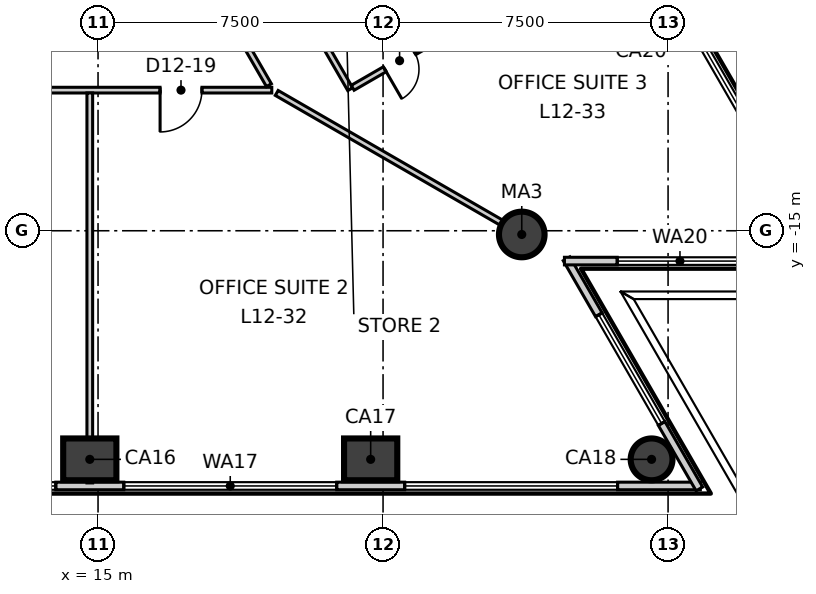
"""IFC4 building model, lengths in metres.
Left out: names, types, materials, properties, quantities, classifications, styles, units other than length and angle.
Written with IfcOpenShell. Run it as: python <this file> out.ifc"""

import sys

from ifc_helpers import new_model, si_unit, direction, frame, frame_2d, origin, origin_2d, place, context, subcontext, project, spatial, rectangle, circle, extrude, element, fill, save


model = new_model("IFC4")
c1 = context("Model", 3, precision=1e-05, world=origin(), true_north=direction((0.0, 1.0)))
c2 = subcontext(c1, "Body", "Model", "MODEL_VIEW")
j1 = project(units=[si_unit("LENGTHUNIT", "METRE"), si_unit("PLANEANGLEUNIT", "RADIAN")], contexts=[c1])
p1 = place(None, origin())
s1 = spatial("IfcSite", under=j1, at=p1, CompositionType="ELEMENT")
p2 = place(p1, origin())
s2 = spatial("IfcBuilding", under=s1, at=p2, CompositionType="ELEMENT")
p3 = place(p2, frame((0.0, 0.0, 59.3)))
s3 = spatial("IfcBuildingStorey", under=s2, at=p3, CompositionType="ELEMENT", Elevation=59.3)
for number, where, z_axis, x_axis in (
    (1, (14.783, -21.015, -0.3), (0.0, 0.0, 1.0), (1.0, 0.0, 0.0)),
    (2, (22.174, -21.015, -0.3), (0.0, 0.0, 1.0), (1.0, 0.0, 0.0)),
):
    element("IfcColumn", number, at=place(p3, frame(where, z_axis=z_axis, x_axis=x_axis)), inside=s3, PredefinedType="COLUMN", context=c2, shape_type="SweptSolid", body=[
        extrude(rectangle(XDim=1.4, YDim=1.1, at=origin_2d()), origin(), (0.0, 0.0, 1.0), 4.0),
    ])
p4 = place(p3, frame((29.566, -21.015, -0.3), z_axis=(0.0, 0.0, 1.0), x_axis=(1.0, 0.0, 0.0)))
e3 = element("IfcColumn", 3, at=p4, inside=s3, PredefinedType="COLUMN", context=c2, shape_type="SweptSolid", body=[
    extrude(circle(Radius=0.55, at=origin_2d()), origin(), (0.0, 0.0, 1.0), 4.0),
])
p5 = place(p3, frame((26.15, -15.098, -0.3), z_axis=(0.0, 0.0, 1.0), x_axis=(1.0, 0.0, 0.0)))
e4 = element("IfcColumn", 4, at=p5, inside=s3, PredefinedType="COLUMN", context=c2, shape_type="SweptSolid", body=[
    extrude(circle(Radius=0.6, at=origin_2d()), origin(), (0.0, 0.0, 1.0), 4.0),
])
p6 = place(p3, frame((-30.869, -21.715, 0.0), z_axis=(0.0, 0.0, 1.0), x_axis=(1.0, 0.0, 0.0)))
e5 = element("IfcWall", 5, at=p6, inside=s3, PredefinedType="ELEMENTEDWALL", context=c2, shape_type="SweptSolid", body=[
    extrude(rectangle(XDim=61.718, YDim=0.2, at=frame_2d((30.859, 0.0))), origin(), (0.0, 0.0, 1.0), 3.7),
])
p7 = place(p6, frame((2.199, 0.0, 0.9)))
e6 = element("IfcOpeningElement", 6, at=p7, cuts=e5, PredefinedType="OPENING", context=c2, shape_type="SweptSolid", body=[
    extrude(rectangle(XDim=5.6, YDim=2.5, at=frame_2d((2.8, 1.25))), frame((0.0, 0.11, 0.0), z_axis=(0.0, -1.0, 0.0), x_axis=(1.0, 0.0, 0.0)), (0.0, 0.0, 1.0), 0.22),
])
p8 = place(p6, frame((9.59, 0.0, 0.9)))
e7 = element("IfcOpeningElement", 7, at=p8, cuts=e5, PredefinedType="OPENING", context=c2, shape_type="SweptSolid", body=[
    extrude(rectangle(XDim=5.6, YDim=2.5, at=frame_2d((2.8, 1.25))), frame((0.0, 0.11, 0.0), z_axis=(0.0, -1.0, 0.0), x_axis=(1.0, 0.0, 0.0)), (0.0, 0.0, 1.0), 0.22),
])
p9 = place(p6, frame((16.982, 0.0, 0.9)))
e8 = element("IfcOpeningElement", 8, at=p9, cuts=e5, PredefinedType="OPENING", context=c2, shape_type="SweptSolid", body=[
    extrude(rectangle(XDim=5.6, YDim=2.5, at=frame_2d((2.8, 1.25))), frame((0.0, 0.11, 0.0), z_axis=(0.0, -1.0, 0.0), x_axis=(1.0, 0.0, 0.0)), (0.0, 0.0, 1.0), 0.22),
])
p10 = place(p6, frame((24.373, 0.0, 0.9)))
e9 = element("IfcOpeningElement", 9, at=p10, cuts=e5, PredefinedType="OPENING", context=c2, shape_type="SweptSolid", body=[
    extrude(rectangle(XDim=5.6, YDim=2.5, at=frame_2d((2.8, 1.25))), frame((0.0, 0.11, 0.0), z_axis=(0.0, -1.0, 0.0), x_axis=(1.0, 0.0, 0.0)), (0.0, 0.0, 1.0), 0.22),
])
p11 = place(p6, frame((31.765, 0.0, 0.9)))
e10 = element("IfcOpeningElement", 10, at=p11, cuts=e5, PredefinedType="OPENING", context=c2, shape_type="SweptSolid", body=[
    extrude(rectangle(XDim=5.6, YDim=2.5, at=frame_2d((2.8, 1.25))), frame((0.0, 0.11, 0.0), z_axis=(0.0, -1.0, 0.0), x_axis=(1.0, 0.0, 0.0)), (0.0, 0.0, 1.0), 0.22),
])
p12 = place(p6, frame((39.156, 0.0, 0.9)))
e11 = element("IfcOpeningElement", 11, at=p12, cuts=e5, PredefinedType="OPENING", context=c2, shape_type="SweptSolid", body=[
    extrude(rectangle(XDim=5.6, YDim=2.5, at=frame_2d((2.8, 1.25))), frame((0.0, 0.11, 0.0), z_axis=(0.0, -1.0, 0.0), x_axis=(1.0, 0.0, 0.0)), (0.0, 0.0, 1.0), 0.22),
])
p13 = place(p6, frame((46.548, 0.0, 0.9)))
e12 = element("IfcOpeningElement", 12, at=p13, cuts=e5, PredefinedType="OPENING", context=c2, shape_type="SweptSolid", body=[
    extrude(rectangle(XDim=5.6, YDim=2.5, at=frame_2d((2.8, 1.25))), frame((0.0, 0.11, 0.0), z_axis=(0.0, -1.0, 0.0), x_axis=(1.0, 0.0, 0.0)), (0.0, 0.0, 1.0), 0.22),
])
p14 = place(p6, frame((53.939, 0.0, 0.9)))
e13 = element("IfcOpeningElement", 13, at=p14, cuts=e5, PredefinedType="OPENING", context=c2, shape_type="SweptSolid", body=[
    extrude(rectangle(XDim=5.6, YDim=2.5, at=frame_2d((2.8, 1.25))), frame((0.0, 0.11, 0.0), z_axis=(0.0, -1.0, 0.0), x_axis=(1.0, 0.0, 0.0)), (0.0, 0.0, 1.0), 0.22),
])
p15 = place(p3, frame((30.824, -21.793, 0.0), z_axis=(0.0, 0.0, 1.0), x_axis=(-0.499969272857, 0.866043143382, 0.0)))
e14 = element("IfcWall", 14, at=p15, inside=s3, PredefinedType="ELEMENTEDWALL", context=c2, shape_type="SweptSolid", body=[
    extrude(rectangle(XDim=6.993, YDim=0.2, at=frame_2d((3.496, 0.0))), origin(), (0.0, 0.0, 1.0), 3.7),
])
p16 = place(p15, frame((1.99, 0.0, 0.9)))
e15 = element("IfcOpeningElement", 15, at=p16, cuts=e14, PredefinedType="OPENING", context=c2, shape_type="SweptSolid", body=[
    extrude(rectangle(XDim=3.3, YDim=2.5, at=frame_2d((1.65, 1.25))), frame((0.0, 0.11, 0.0), z_axis=(0.0, -1.0, 0.0), x_axis=(1.0, 0.0, 0.0)), (0.0, 0.0, 1.0), 0.22),
])
p17 = place(p3, frame((27.273, -15.798, 0.0), z_axis=(0.0, 0.0, 1.0), x_axis=(1.0, 0.0, 0.0)))
e16 = element("IfcWall", 16, at=p17, inside=s3, PredefinedType="ELEMENTEDWALL", context=c2, shape_type="SweptSolid", body=[
    extrude(rectangle(XDim=6.993, YDim=0.2, at=frame_2d((3.497, 0.0))), origin(), (0.0, 0.0, 1.0), 3.7),
])
p18 = place(p17, frame((1.39, 0.0, 0.9)))
e17 = element("IfcOpeningElement", 17, at=p18, cuts=e16, PredefinedType="OPENING", context=c2, shape_type="SweptSolid", body=[
    extrude(rectangle(XDim=3.3, YDim=2.5, at=frame_2d((1.65, 1.25))), frame((0.0, 0.11, 0.0), z_axis=(0.0, -1.0, 0.0), x_axis=(1.0, 0.0, 0.0)), (0.0, 0.0, 1.0), 0.22),
])
p19 = place(p3, frame((34.241, -15.876, 0.0), z_axis=(0.0, 0.0, 1.0), x_axis=(-0.500006313899, 0.866021758423, 0.0)))
e18 = element("IfcWall", 18, at=p19, inside=s3, PredefinedType="ELEMENTEDWALL", context=c2, shape_type="SweptSolid", body=[
    extrude(rectangle(XDim=61.719, YDim=0.2, at=frame_2d((30.859, 0.0))), origin(), (0.0, 0.0, 1.0), 3.7),
])
p20 = place(p19, frame((2.199, 0.0, 0.9)))
e19 = element("IfcOpeningElement", 19, at=p20, cuts=e18, PredefinedType="OPENING", context=c2, shape_type="SweptSolid", body=[
    extrude(rectangle(XDim=5.6, YDim=2.5, at=frame_2d((2.8, 1.25))), frame((0.0, 0.11, 0.0), z_axis=(0.0, -1.0, 0.0), x_axis=(1.0, 0.0, 0.0)), (0.0, 0.0, 1.0), 0.22),
])
p21 = place(p19, frame((9.59, 0.0, 0.9)))
e20 = element("IfcOpeningElement", 20, at=p21, cuts=e18, PredefinedType="OPENING", context=c2, shape_type="SweptSolid", body=[
    extrude(rectangle(XDim=5.6, YDim=2.5, at=frame_2d((2.8, 1.25))), frame((0.0, 0.11, 0.0), z_axis=(0.0, -1.0, 0.0), x_axis=(1.0, 0.0, 0.0)), (0.0, 0.0, 1.0), 0.22),
])
p22 = place(p19, frame((16.982, 0.0, 0.9)))
e21 = element("IfcOpeningElement", 21, at=p22, cuts=e18, PredefinedType="OPENING", context=c2, shape_type="SweptSolid", body=[
    extrude(rectangle(XDim=5.6, YDim=2.5, at=frame_2d((2.8, 1.25))), frame((0.0, 0.11, 0.0), z_axis=(0.0, -1.0, 0.0), x_axis=(1.0, 0.0, 0.0)), (0.0, 0.0, 1.0), 0.22),
])
p23 = place(p19, frame((24.374, 0.0, 0.9)))
e22 = element("IfcOpeningElement", 22, at=p23, cuts=e18, PredefinedType="OPENING", context=c2, shape_type="SweptSolid", body=[
    extrude(rectangle(XDim=5.6, YDim=2.5, at=frame_2d((2.8, 1.25))), frame((0.0, 0.11, 0.0), z_axis=(0.0, -1.0, 0.0), x_axis=(1.0, 0.0, 0.0)), (0.0, 0.0, 1.0), 0.22),
])
p24 = place(p19, frame((31.765, 0.0, 0.9)))
e23 = element("IfcOpeningElement", 23, at=p24, cuts=e18, PredefinedType="OPENING", context=c2, shape_type="SweptSolid", body=[
    extrude(rectangle(XDim=5.6, YDim=2.5, at=frame_2d((2.8, 1.25))), frame((0.0, 0.11, 0.0), z_axis=(0.0, -1.0, 0.0), x_axis=(1.0, 0.0, 0.0)), (0.0, 0.0, 1.0), 0.22),
])
p25 = place(p19, frame((39.157, 0.0, 0.9)))
e24 = element("IfcOpeningElement", 24, at=p25, cuts=e18, PredefinedType="OPENING", context=c2, shape_type="SweptSolid", body=[
    extrude(rectangle(XDim=5.6, YDim=2.5, at=frame_2d((2.8, 1.25))), frame((0.0, 0.11, 0.0), z_axis=(0.0, -1.0, 0.0), x_axis=(1.0, 0.0, 0.0)), (0.0, 0.0, 1.0), 0.22),
])
p26 = place(p19, frame((46.549, 0.0, 0.9)))
e25 = element("IfcOpeningElement", 25, at=p26, cuts=e18, PredefinedType="OPENING", context=c2, shape_type="SweptSolid", body=[
    extrude(rectangle(XDim=5.6, YDim=2.5, at=frame_2d((2.8, 1.25))), frame((0.0, 0.11, 0.0), z_axis=(0.0, -1.0, 0.0), x_axis=(1.0, 0.0, 0.0)), (0.0, 0.0, 1.0), 0.22),
])
p27 = place(p19, frame((53.94, 0.0, 0.9)))
e26 = element("IfcOpeningElement", 26, at=p27, cuts=e18, PredefinedType="OPENING", context=c2, shape_type="SweptSolid", body=[
    extrude(rectangle(XDim=5.6, YDim=2.5, at=frame_2d((2.8, 1.25))), frame((0.0, 0.11, 0.0), z_axis=(0.0, -1.0, 0.0), x_axis=(1.0, 0.0, 0.0)), (0.0, 0.0, 1.0), 0.22),
])
p28 = place(p3, frame((-19.422, -11.3, 0.0), z_axis=(0.0, 0.0, 1.0), x_axis=(1.0, 0.0, 0.0)))
e27 = element("IfcWall", 27, at=p28, inside=s3, PredefinedType="PARTITIONING", context=c2, shape_type="SweptSolid", body=[
    extrude(rectangle(XDim=38.994, YDim=0.15, at=frame_2d((19.497, 0.0))), origin(), (0.0, 0.0, 1.0), 3.7),
])
p29 = place(p28, frame((1.7, 0.0, 0.0)))
e28 = element("IfcOpeningElement", 28, at=p29, cuts=e27, PredefinedType="OPENING", context=c2, shape_type="SweptSolid", body=[
    extrude(rectangle(XDim=1.1, YDim=2.1, at=frame_2d((0.55, 1.05))), frame((0.0, 0.085, 0.0), z_axis=(0.0, -1.0, 0.0), x_axis=(1.0, 0.0, 0.0)), (0.0, 0.0, 1.0), 0.17),
])
p30 = place(p28, frame((12.889, 0.0, 0.0)))
e29 = element("IfcOpeningElement", 29, at=p30, cuts=e27, PredefinedType="OPENING", context=c2, shape_type="SweptSolid", body=[
    extrude(rectangle(XDim=1.0, YDim=2.1, at=frame_2d((0.5, 1.05))), frame((0.0, 0.085, 0.0), z_axis=(0.0, -1.0, 0.0), x_axis=(1.0, 0.0, 0.0)), (0.0, 0.0, 1.0), 0.17),
])
p31 = place(p28, frame((5.589, 0.0, 0.0)))
e30 = element("IfcOpeningElement", 30, at=p31, cuts=e27, PredefinedType="OPENING", context=c2, shape_type="SweptSolid", body=[
    extrude(rectangle(XDim=0.9, YDim=2.1, at=frame_2d((0.45, 1.05))), frame((0.0, 0.085, 0.0), z_axis=(0.0, -1.0, 0.0), x_axis=(1.0, 0.0, 0.0)), (0.0, 0.0, 1.0), 0.17),
])
p32 = place(p28, frame((29.272, 0.0, 0.0)))
e31 = element("IfcOpeningElement", 31, at=p32, cuts=e27, PredefinedType="OPENING", context=c2, shape_type="SweptSolid", body=[
    extrude(rectangle(XDim=1.1, YDim=2.1, at=frame_2d((0.55, 1.05))), frame((0.0, 0.085, 0.0), z_axis=(0.0, -1.0, 0.0), x_axis=(1.0, 0.0, 0.0)), (0.0, 0.0, 1.0), 0.17),
])
p33 = place(p28, frame((20.772, 0.0, 0.0)))
e32 = element("IfcOpeningElement", 32, at=p33, cuts=e27, PredefinedType="OPENING", context=c2, shape_type="SweptSolid", body=[
    extrude(rectangle(XDim=0.9, YDim=2.1, at=frame_2d((0.45, 1.05))), frame((0.0, 0.085, 0.0), z_axis=(0.0, -1.0, 0.0), x_axis=(1.0, 0.0, 0.0)), (0.0, 0.0, 1.0), 0.17),
])
p34 = place(p28, frame((23.772, 0.0, 0.0)))
e33 = element("IfcOpeningElement", 33, at=p34, cuts=e27, PredefinedType="OPENING", context=c2, shape_type="SweptSolid", body=[
    extrude(rectangle(XDim=0.9, YDim=2.1, at=frame_2d((0.45, 1.05))), frame((0.0, 0.085, 0.0), z_axis=(0.0, -1.0, 0.0), x_axis=(1.0, 0.0, 0.0)), (0.0, 0.0, 1.0), 0.17),
])
p35 = place(p28, frame((36.055, 0.0, 0.0)))
e34 = element("IfcOpeningElement", 34, at=p35, cuts=e27, PredefinedType="OPENING", context=c2, shape_type="SweptSolid", body=[
    extrude(rectangle(XDim=1.1, YDim=2.1, at=frame_2d((0.55, 1.05))), frame((0.0, 0.085, 0.0), z_axis=(0.0, -1.0, 0.0), x_axis=(1.0, 0.0, 0.0)), (0.0, 0.0, 1.0), 0.17),
])
p36 = place(p3, frame((19.702, -11.374, 0.0), z_axis=(0.0, 0.0, 1.0), x_axis=(0.866050014035, -0.499957371373, 0.0)))
e35 = element("IfcWall", 35, at=p36, inside=s3, PredefinedType="PARTITIONING", context=c2, shape_type="SweptSolid", body=[
    extrude(rectangle(XDim=8.067, YDim=0.15, at=frame_2d((4.033, 0.0))), origin(), (0.0, 0.0, 1.0), 3.1),
])
p37 = place(p3, frame((0.075, 22.47, 0.0), z_axis=(0.0, 0.0, 1.0), x_axis=(0.500002280369, -0.866024087209, 0.0)))
e36 = element("IfcWall", 36, at=p37, inside=s3, PredefinedType="PARTITIONING", context=c2, shape_type="SweptSolid", body=[
    extrude(rectangle(XDim=38.844, YDim=0.15, at=frame_2d((19.422, 0.0))), origin(), (0.0, 0.0, 1.0), 3.7),
])
p38 = place(p37, frame((36.044, 0.0, 0.0)))
e37 = element("IfcOpeningElement", 37, at=p38, cuts=e36, PredefinedType="OPENING", context=c2, shape_type="SweptSolid", body=[
    extrude(rectangle(XDim=1.1, YDim=2.1, at=frame_2d((0.55, 1.05))), frame((0.0, 0.085, 0.0), z_axis=(0.0, -1.0, 0.0), x_axis=(1.0, 0.0, 0.0)), (0.0, 0.0, 1.0), 0.17),
])
p39 = place(p37, frame((26.255, 0.0, 0.0)))
e38 = element("IfcOpeningElement", 38, at=p39, cuts=e36, PredefinedType="OPENING", context=c2, shape_type="SweptSolid", body=[
    extrude(rectangle(XDim=1.1, YDim=2.1, at=frame_2d((0.55, 1.05))), frame((0.0, 0.085, 0.0), z_axis=(0.0, -1.0, 0.0), x_axis=(1.0, 0.0, 0.0)), (0.0, 0.0, 1.0), 0.17),
])
p40 = place(p37, frame((9.173, 0.0, 0.0)))
e39 = element("IfcOpeningElement", 39, at=p40, cuts=e36, PredefinedType="OPENING", context=c2, shape_type="SweptSolid", body=[
    extrude(rectangle(XDim=1.1, YDim=2.1, at=frame_2d((0.55, 1.05))), frame((0.0, 0.085, 0.0), z_axis=(0.0, -1.0, 0.0), x_axis=(1.0, 0.0, 0.0)), (0.0, 0.0, 1.0), 0.17),
])
p41 = place(p37, frame((17.373, 0.0, 0.0)))
e40 = element("IfcOpeningElement", 40, at=p41, cuts=e36, PredefinedType="OPENING", context=c2, shape_type="SweptSolid", body=[
    extrude(rectangle(XDim=0.9, YDim=2.1, at=frame_2d((0.45, 1.05))), frame((0.0, 0.085, 0.0), z_axis=(0.0, -1.0, 0.0), x_axis=(1.0, 0.0, 0.0)), (0.0, 0.0, 1.0), 0.17),
])
p42 = place(p37, frame((14.173, 0.0, 0.0)))
e41 = element("IfcOpeningElement", 41, at=p42, cuts=e36, PredefinedType="OPENING", context=c2, shape_type="SweptSolid", body=[
    extrude(rectangle(XDim=0.9, YDim=2.1, at=frame_2d((0.45, 1.05))), frame((0.0, 0.085, 0.0), z_axis=(0.0, -1.0, 0.0), x_axis=(1.0, 0.0, 0.0)), (0.0, 0.0, 1.0), 0.17),
])
p43 = place(p37, frame((11.273, 0.0, 0.0)))
e42 = element("IfcOpeningElement", 42, at=p43, cuts=e36, PredefinedType="OPENING", context=c2, shape_type="SweptSolid", body=[
    extrude(rectangle(XDim=1.0, YDim=2.1, at=frame_2d((0.5, 1.05))), frame((0.0, 0.085, 0.0), z_axis=(0.0, -1.0, 0.0), x_axis=(1.0, 0.0, 0.0)), (0.0, 0.0, 1.0), 0.17),
])
p44 = place(p37, frame((1.689, 0.0, 0.0)))
e43 = element("IfcOpeningElement", 43, at=p44, cuts=e36, PredefinedType="OPENING", context=c2, shape_type="SweptSolid", body=[
    extrude(rectangle(XDim=1.1, YDim=2.1, at=frame_2d((0.55, 1.05))), frame((0.0, 0.085, 0.0), z_axis=(0.0, -1.0, 0.0), x_axis=(1.0, 0.0, 0.0)), (0.0, 0.0, 1.0), 0.17),
])
p45 = place(p3, frame((14.783, -21.635, 0.0), z_axis=(0.0, 0.0, 1.0), x_axis=(0.0, 1.0, 0.0)))
e44 = element("IfcWall", 44, at=p45, inside=s3, PredefinedType="PARTITIONING", context=c2, shape_type="SweptSolid", body=[
    extrude(rectangle(XDim=10.26, YDim=0.15, at=frame_2d((5.13, 0.0))), origin(), (0.0, 0.0, 1.0), 3.7),
])
p46 = place(p3, frame((18.774, -6.317, 0.0), z_axis=(0.0, 0.0, 1.0), x_axis=(0.499941490393, -0.866059181686, 0.0)))
e45 = element("IfcWall", 45, at=p46, inside=s3, PredefinedType="PARTITIONING", context=c2, shape_type="SweptSolid", body=[
    extrude(rectangle(XDim=5.725, YDim=0.15, at=frame_2d((2.862, 0.0))), origin(), (0.0, 0.0, 1.0), 3.7),
])
p47 = place(p46, frame((1.275, 0.0, 0.0)))
e46 = element("IfcOpeningElement", 46, at=p47, cuts=e45, PredefinedType="OPENING", context=c2, shape_type="SweptSolid", body=[
    extrude(rectangle(XDim=0.9, YDim=2.1, at=frame_2d((0.45, 1.05))), frame((0.0, 0.085, 0.0), z_axis=(0.0, -1.0, 0.0), x_axis=(1.0, 0.0, 0.0)), (0.0, 0.0, 1.0), 0.17),
])
p48 = place(p3, frame((21.701, -11.238, 0.0), z_axis=(0.0, 0.0, 1.0), x_axis=(0.866090043625, 0.499888023795, 0.0)))
e47 = element("IfcWall", 47, at=p48, inside=s3, PredefinedType="PARTITIONING", context=c2, shape_type="SweptSolid", body=[
    extrude(rectangle(XDim=2.851, YDim=0.15, at=frame_2d((1.425, 0.0))), origin(), (0.0, 0.0, 1.0), 3.7),
])
p49 = place(p48, frame((0.975, 0.0, 0.0)))
e48 = element("IfcOpeningElement", 48, at=p49, cuts=e47, PredefinedType="OPENING", context=c2, shape_type="SweptSolid", body=[
    extrude(rectangle(XDim=0.9, YDim=2.1, at=frame_2d((0.45, 1.05))), frame((0.0, 0.085, 0.0), z_axis=(0.0, -1.0, 0.0), x_axis=(1.0, 0.0, 0.0)), (0.0, 0.0, 1.0), 0.17),
])
p50 = place(p12, origin())
e49 = element("IfcWindow", 49, at=p50, inside=s3, PartitioningType="SINGLE_PANEL", PredefinedType="WINDOW", context=c2, shape_type="SweptSolid", body=[
    extrude(rectangle(XDim=5.6, YDim=2.5, at=frame_2d((2.8, 1.25))), frame((0.0, 0.03, 0.0), z_axis=(0.0, -1.0, 0.0), x_axis=(1.0, 0.0, 0.0)), (0.0, 0.0, 1.0), 0.06),
])
fill(e11, e49)
p51 = place(p13, origin())
e50 = element("IfcWindow", 50, at=p51, inside=s3, PartitioningType="SINGLE_PANEL", PredefinedType="WINDOW", context=c2, shape_type="SweptSolid", body=[
    extrude(rectangle(XDim=5.6, YDim=2.5, at=frame_2d((2.8, 1.25))), frame((0.0, 0.03, 0.0), z_axis=(0.0, -1.0, 0.0), x_axis=(1.0, 0.0, 0.0)), (0.0, 0.0, 1.0), 0.06),
])
fill(e12, e50)
p52 = place(p14, origin())
e51 = element("IfcWindow", 51, at=p52, inside=s3, PartitioningType="SINGLE_PANEL", PredefinedType="WINDOW", context=c2, shape_type="SweptSolid", body=[
    extrude(rectangle(XDim=5.6, YDim=2.5, at=frame_2d((2.8, 1.25))), frame((0.0, 0.03, 0.0), z_axis=(0.0, -1.0, 0.0), x_axis=(1.0, 0.0, 0.0)), (0.0, 0.0, 1.0), 0.06),
])
fill(e13, e51)
p53 = place(p16, origin())
e52 = element("IfcWindow", 52, at=p53, inside=s3, PartitioningType="SINGLE_PANEL", PredefinedType="WINDOW", context=c2, shape_type="SweptSolid", body=[
    extrude(rectangle(XDim=3.3, YDim=2.5, at=frame_2d((1.65, 1.25))), frame((0.0, 0.03, 0.0), z_axis=(0.0, -1.0, 0.0), x_axis=(1.0, 0.0, 0.0)), (0.0, 0.0, 1.0), 0.06),
])
fill(e15, e52)
p54 = place(p18, origin())
e53 = element("IfcWindow", 53, at=p54, inside=s3, PartitioningType="SINGLE_PANEL", PredefinedType="WINDOW", context=c2, shape_type="SweptSolid", body=[
    extrude(rectangle(XDim=3.3, YDim=2.5, at=frame_2d((1.65, 1.25))), frame((0.0, 0.03, 0.0), z_axis=(0.0, -1.0, 0.0), x_axis=(1.0, 0.0, 0.0)), (0.0, 0.0, 1.0), 0.06),
])
fill(e17, e53)
p55 = place(p20, origin())
e54 = element("IfcWindow", 54, at=p55, inside=s3, PartitioningType="SINGLE_PANEL", PredefinedType="WINDOW", context=c2, shape_type="SweptSolid", body=[
    extrude(rectangle(XDim=5.6, YDim=2.5, at=frame_2d((2.8, 1.25))), frame((0.0, 0.03, 0.0), z_axis=(0.0, -1.0, 0.0), x_axis=(1.0, 0.0, 0.0)), (0.0, 0.0, 1.0), 0.06),
])
fill(e19, e54)
p56 = place(p35, origin())
e55 = element("IfcDoor", 55, at=p56, inside=s3, OperationType="SINGLE_SWING_LEFT", PredefinedType="DOOR", context=c2, shape_type="SweptSolid", body=[
    extrude(rectangle(XDim=1.1, YDim=2.1, at=frame_2d((0.55, 1.05))), frame((0.0, 0.025, 0.0), z_axis=(0.0, -1.0, 0.0), x_axis=(1.0, 0.0, 0.0)), (0.0, 0.0, 1.0), 0.05),
])
fill(e34, e55)
p57 = place(p49, origin())
e56 = element("IfcDoor", 56, at=p57, inside=s3, OperationType="SINGLE_SWING_LEFT", PredefinedType="DOOR", context=c2, shape_type="SweptSolid", body=[
    extrude(rectangle(XDim=0.9, YDim=2.1, at=frame_2d((0.45, 1.05))), frame((0.0, 0.025, 0.0), z_axis=(0.0, -1.0, 0.0), x_axis=(1.0, 0.0, 0.0)), (0.0, 0.0, 1.0), 0.05),
])
fill(e48, e56)
save(model, sys.argv[1])
